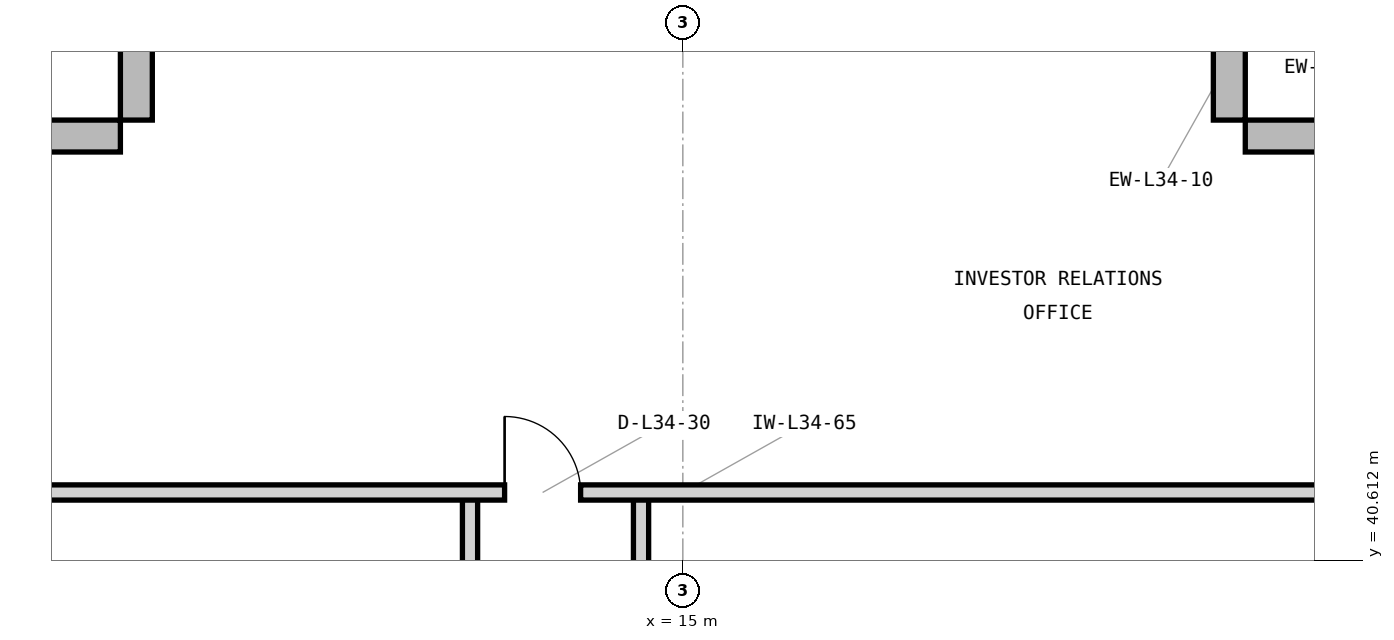
"""IFC4 building model, lengths in metres.
Left out: names, types, materials, properties, quantities, classifications, styles, units other than length and angle.
Written with IfcOpenShell. Run it as: python <this file> out.ifc"""

import sys

from ifc_helpers import new_model, si_unit, direction, frame, frame_2d, origin, place, context, subcontext, project, spatial, rectangle, extrude, element, fill, save


model = new_model("IFC4")
c1 = context("Model", 3, precision=1e-05, world=origin(), true_north=direction((0.0, 1.0)))
c2 = subcontext(c1, "Body", "Model", "MODEL_VIEW")
j1 = project(units=[si_unit("LENGTHUNIT", "METRE"), si_unit("PLANEANGLEUNIT", "RADIAN")], contexts=[c1])
p1 = place(None, origin())
s1 = spatial("IfcSite", under=j1, at=p1, CompositionType="ELEMENT")
p2 = place(p1, origin())
s2 = spatial("IfcBuilding", under=s1, at=p2, CompositionType="ELEMENT")
p3 = place(p2, frame((0.0, 0.0, 144.0)))
s3 = spatial("IfcBuildingStorey", under=s2, at=p3, CompositionType="ELEMENT", Elevation=144.0)
for number, where, z_axis, x_axis in (
    (1, (24.0, 46.19, 0.0), (0.0, 0.0, 1.0), (-1.0, 0.0, 0.0)),
    (2, (22.19, 46.4, 0.0), (0.0, 0.0, 1.0), (0.0, 1.0, 0.0)),
    (3, (7.81, 48.0, 0.0), (0.0, 0.0, 1.0), (0.0, -1.0, 0.0)),
    (4, (7.6, 46.19, 0.0), (0.0, 0.0, 1.0), (-1.0, 0.0, 0.0)),
):
    element("IfcWall", number, at=place(p3, frame(where, z_axis=z_axis, x_axis=x_axis)), inside=s3, PredefinedType="STANDARD", context=c2, shape_type="SweptSolid", body=[
        extrude(rectangle(XDim=1.6, YDim=0.42, at=frame_2d((0.8, 0.0))), origin(), (0.0, 0.0, 1.0), 3.7),
    ])
p4 = place(p3, frame((12.2, 29.18, 0.0), z_axis=(0.0, 0.0, 1.0), x_axis=(0.0, 1.0, 0.0)))
e5 = element("IfcWall", 5, at=p4, inside=s3, PredefinedType="PARTITIONING", context=c2, shape_type="SweptSolid", body=[
    extrude(rectangle(XDim=12.32, YDim=0.2, at=frame_2d((6.16, 0.0))), origin(), (0.0, 0.0, 1.0), 3.69),
])
p5 = place(p4, frame((5.66, 0.0, 0.0)))
e6 = element("IfcOpeningElement", 6, at=p5, cuts=e5, PredefinedType="OPENING", context=c2, shape_type="SweptSolid", body=[
    extrude(rectangle(XDim=1.0, YDim=2.15, at=frame_2d((0.5, 1.075))), frame((0.0, 0.11, 0.0), z_axis=(0.0, -1.0, 0.0), x_axis=(1.0, 0.0, 0.0)), (0.0, 0.0, 1.0), 0.22),
])
p6 = place(p3, frame((14.45, 36.18, 0.0), z_axis=(0.0, 0.0, 1.0), x_axis=(0.0, 1.0, 0.0)))
e7 = element("IfcWall", 7, at=p6, inside=s3, PredefinedType="PARTITIONING", context=c2, shape_type="SweptSolid", body=[
    extrude(rectangle(XDim=5.32, YDim=0.2, at=frame_2d((2.66, 0.0))), origin(), (0.0, 0.0, 1.0), 3.69),
])
p7 = place(p6, frame((1.91, 0.0, 0.0)))
e8 = element("IfcOpeningElement", 8, at=p7, cuts=e7, PredefinedType="OPENING", context=c2, shape_type="SweptSolid", body=[
    extrude(rectangle(XDim=1.5, YDim=2.3, at=frame_2d((0.75, 1.15))), frame((0.0, 0.11, 0.0), z_axis=(0.0, -1.0, 0.0), x_axis=(1.0, 0.0, 0.0)), (0.0, 0.0, 1.0), 0.22),
])
p8 = place(p3, frame((6.18, 41.5, 0.0), z_axis=(0.0, 0.0, 1.0), x_axis=(1.0, 0.0, 0.0)))
e9 = element("IfcWall", 9, at=p8, inside=s3, PredefinedType="PARTITIONING", context=c2, shape_type="SweptSolid", body=[
    extrude(rectangle(XDim=17.64, YDim=0.2, at=frame_2d((8.82, 0.0))), origin(), (0.0, 0.0, 1.0), 3.69),
])
p9 = place(p8, frame((6.475, 0.0, 0.0)))
e10 = element("IfcOpeningElement", 10, at=p9, cuts=e9, PredefinedType="OPENING", context=c2, shape_type="SweptSolid", body=[
    extrude(rectangle(XDim=1.0, YDim=2.15, at=frame_2d((0.5, 1.075))), frame((0.0, 0.11, 0.0), z_axis=(0.0, -1.0, 0.0), x_axis=(1.0, 0.0, 0.0)), (0.0, 0.0, 1.0), 0.22),
])
p10 = place(p9, origin())
e11 = element("IfcDoor", 11, at=p10, inside=s3, OperationType="SINGLE_SWING_LEFT", PredefinedType="DOOR", context=c2, shape_type="SweptSolid", body=[
    extrude(rectangle(XDim=1.0, YDim=2.15, at=frame_2d((0.5, 1.075))), frame((0.0, 0.025, 0.0), z_axis=(0.0, -1.0, 0.0), x_axis=(1.0, 0.0, 0.0)), (0.0, 0.0, 1.0), 0.05),
])
fill(e10, e11)
save(model, sys.argv[1])
